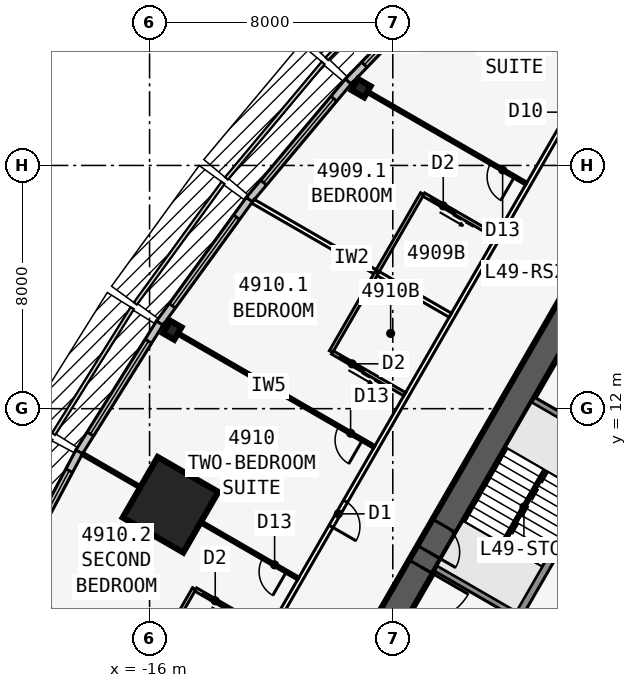
"""IFC4 building model, lengths in metres.
Left out: names, types, materials, properties, quantities, classifications, styles, units other than length and angle.
Written with IfcOpenShell. Run it as: python <this file> out.ifc"""

import sys

from ifc_helpers import new_model, si_unit, direction, frame, frame_2d, origin, origin_2d, place, context, subcontext, project, spatial, rectangle, i_section, extrude, element, fill, save


model = new_model("IFC4")
c1 = context("Model", 3, precision=1e-05, world=origin(), true_north=direction((0.0, 1.0)))
c2 = subcontext(c1, "Body", "Model", "MODEL_VIEW")
j1 = project(units=[si_unit("LENGTHUNIT", "METRE"), si_unit("PLANEANGLEUNIT", "RADIAN")], contexts=[c1])
p1 = place(None, origin())
s1 = spatial("IfcSite", under=j1, at=p1, CompositionType="ELEMENT")
p2 = place(p1, origin())
s2 = spatial("IfcBuilding", under=s1, at=p2, CompositionType="ELEMENT")
p3 = place(p2, frame((0.0, 0.0, 182.7)))
s3 = spatial("IfcBuildingStorey", under=s2, at=p3, CompositionType="ELEMENT", Elevation=182.7)
p4 = place(p3, frame((0.0, 19.052, 0.0), z_axis=(0.0, 0.0, 1.0), x_axis=(-0.499999749417, -0.866025548458, 0.0)))
e1 = element("IfcWall", 1, at=p4, inside=s3, PredefinedType="SHEAR", context=c2, shape_type="SweptSolid", body=[
    extrude(rectangle(XDim=33.0, YDim=0.9, at=frame_2d((16.5, 0.0))), origin(), (0.0, 0.0, 1.0), 3.4),
])
p5 = place(p4, frame((14.15, 0.0, 0.0)))
e2 = element("IfcOpeningElement", 2, at=p5, cuts=e1, PredefinedType="OPENING", context=c2, shape_type="SweptSolid", body=[
    extrude(rectangle(XDim=1.8, YDim=2.13, at=frame_2d((0.9, 1.065))), frame((0.0, 0.46, 0.0), z_axis=(0.0, -1.0, 0.0), x_axis=(1.0, 0.0, 0.0)), (0.0, 0.0, 1.0), 0.92),
])
p6 = place(p4, frame((12.6, 0.0, 0.0)))
e3 = element("IfcOpeningElement", 3, at=p6, cuts=e1, PredefinedType="OPENING", context=c2, shape_type="SweptSolid", body=[
    extrude(rectangle(XDim=1.0, YDim=2.13, at=frame_2d((0.5, 1.065))), frame((0.0, 0.46, 0.0), z_axis=(0.0, -1.0, 0.0), x_axis=(1.0, 0.0, 0.0)), (0.0, 0.0, 1.0), 0.92),
])
p7 = place(p3, frame((-0.062, 11.794, 0.0), z_axis=(0.0, 0.0, 1.0), x_axis=(-0.500006680225, -0.86602154692, 0.0)))
e4 = element("IfcWall", 4, at=p7, inside=s3, PredefinedType="SOLIDWALL", context=c2, shape_type="SweptSolid", body=[
    extrude(rectangle(XDim=7.733, YDim=0.25, at=frame_2d((3.866, 0.0))), origin(), (0.0, 0.0, 1.0), 3.235),
])
for number, where, z_axis, x_axis in (
    (5, (-0.679, 10.727, 0.0), (0.0, 0.0, 1.0), (-0.866, 0.5, 0.0)),
    (6, (-3.879, 5.184, 0.0), (0.0, 0.0, 1.0), (-0.866, 0.5, 0.0)),
):
    element("IfcWall", number, at=place(p3, frame(where, z_axis=z_axis, x_axis=x_axis)), inside=s3, PredefinedType="SOLIDWALL", context=c2, shape_type="SweptSolid", body=[
        extrude(rectangle(XDim=3.125, YDim=0.2, at=frame_2d((1.562, 0.0))), origin(), (0.0, 0.0, 1.0), 3.235),
    ])
for number, where, z_axis, x_axis in (
    (7, (-9.041, 22.541, 0.0), (0.0, 0.0, 1.0), (-0.5, -0.866, 0.0)),
    (8, (-15.254, 14.58, 0.0), (0.0, 0.0, 1.0), (-0.866, 0.5, 0.0)),
):
    element("IfcColumn", number, at=place(p3, frame(where, z_axis=z_axis, x_axis=x_axis)), inside=s3, PredefinedType="COLUMN", context=c2, shape_type="SweptSolid", body=[
        extrude(i_section(OverallWidth=0.424, OverallDepth=0.475, WebThickness=0.048, FlangeThickness=0.077, at=origin_2d()), origin(), (0.0, 0.0, 1.0), 3.4),
    ])
p8 = place(p3, frame((-15.312, 8.84, 0.0), z_axis=(0.0, 0.0, 1.0), x_axis=(-0.866025403784, 0.5, 0.0)))
e9 = element("IfcColumn", 9, at=p8, inside=s3, PredefinedType="COLUMN", context=c2, shape_type="SweptSolid", body=[
    extrude(rectangle(XDim=2.3, YDim=2.3, at=origin_2d()), origin(), (0.0, 0.0, 1.0), 3.4),
])
p9 = place(p3, frame((-5.91, 26.472, 0.0), z_axis=(0.0, 0.0, 1.0), x_axis=(-0.691719937936, -0.722165858693, 0.0)))
e10 = element("IfcWall", 10, at=p9, inside=s3, PredefinedType="STANDARD", context=c2, shape_type="SweptSolid", body=[
    extrude(rectangle(XDim=5.148, YDim=0.25, at=frame_2d((2.574, 0.0))), origin(), (0.0, 0.0, 1.0), 3.235),
])
p10 = place(p9, frame((0.774, 0.0, 0.45)))
e11 = element("IfcOpeningElement", 11, at=p10, cuts=e10, PredefinedType="OPENING", context=c2, shape_type="SweptSolid", body=[
    extrude(rectangle(XDim=3.6, YDim=2.4, at=frame_2d((1.8, 1.2))), frame((0.0, 0.135, 0.0), z_axis=(0.0, -1.0, 0.0), x_axis=(1.0, 0.0, 0.0)), (0.0, 0.0, 1.0), 0.27),
])
p11 = place(p3, frame((-9.465, 22.76, 0.0), z_axis=(0.0, 0.0, 1.0), x_axis=(-0.641810386606, -0.766863369607, 0.0)))
e12 = element("IfcWall", 12, at=p11, inside=s3, PredefinedType="STANDARD", context=c2, shape_type="SweptSolid", body=[
    extrude(rectangle(XDim=5.076, YDim=0.25, at=frame_2d((2.538, 0.0))), origin(), (0.0, 0.0, 1.0), 3.235),
])
p12 = place(p11, frame((0.738, 0.0, 0.45)))
e13 = element("IfcOpeningElement", 13, at=p12, cuts=e12, PredefinedType="OPENING", context=c2, shape_type="SweptSolid", body=[
    extrude(rectangle(XDim=3.6, YDim=2.4, at=frame_2d((1.8, 1.2))), frame((0.0, 0.135, 0.0), z_axis=(0.0, -1.0, 0.0), x_axis=(1.0, 0.0, 0.0)), (0.0, 0.0, 1.0), 0.27),
])
p13 = place(p3, frame((-12.718, 18.875, 0.0), z_axis=(0.0, 0.0, 1.0), x_axis=(-0.587669188412, -0.809101307001, 0.0)))
e14 = element("IfcWall", 14, at=p13, inside=s3, PredefinedType="STANDARD", context=c2, shape_type="SweptSolid", body=[
    extrude(rectangle(XDim=5.028, YDim=0.25, at=frame_2d((2.514, 0.0))), origin(), (0.0, 0.0, 1.0), 3.235),
])
p14 = place(p13, frame((0.714, 0.0, 0.45)))
e15 = element("IfcOpeningElement", 15, at=p14, cuts=e14, PredefinedType="OPENING", context=c2, shape_type="SweptSolid", body=[
    extrude(rectangle(XDim=3.6, YDim=2.4, at=frame_2d((1.8, 1.2))), frame((0.0, 0.135, 0.0), z_axis=(0.0, -1.0, 0.0), x_axis=(1.0, 0.0, 0.0)), (0.0, 0.0, 1.0), 0.27),
])
p15 = place(p3, frame((-15.667, 14.814, 0.0), z_axis=(0.0, 0.0, 1.0), x_axis=(-0.529990167382, -0.84800378683, 0.0)))
e16 = element("IfcWall", 16, at=p15, inside=s3, PredefinedType="STANDARD", context=c2, shape_type="SweptSolid", body=[
    extrude(rectangle(XDim=5.003, YDim=0.25, at=frame_2d((2.501, 0.0))), origin(), (0.0, 0.0, 1.0), 3.235),
])
p16 = place(p15, frame((0.701, 0.0, 0.45)))
e17 = element("IfcOpeningElement", 17, at=p16, cuts=e16, PredefinedType="OPENING", context=c2, shape_type="SweptSolid", body=[
    extrude(rectangle(XDim=3.6, YDim=2.4, at=frame_2d((1.8, 1.2))), frame((0.0, 0.135, 0.0), z_axis=(0.0, -1.0, 0.0), x_axis=(1.0, 0.0, 0.0)), (0.0, 0.0, 1.0), 0.27),
])
p17 = place(p3, frame((-18.314, 10.579, 0.0), z_axis=(0.0, 0.0, 1.0), x_axis=(-0.469404966864, -0.882982999317, 0.0)))
e18 = element("IfcWall", 18, at=p17, inside=s3, PredefinedType="STANDARD", context=c2, shape_type="SweptSolid", body=[
    extrude(rectangle(XDim=5.003, YDim=0.25, at=frame_2d((2.501, 0.0))), origin(), (0.0, 0.0, 1.0), 3.235),
])
p18 = place(p17, frame((0.701, 0.0, 0.45)))
e19 = element("IfcOpeningElement", 19, at=p18, cuts=e18, PredefinedType="OPENING", context=c2, shape_type="SweptSolid", body=[
    extrude(rectangle(XDim=3.6, YDim=2.4, at=frame_2d((1.8, 1.2))), frame((0.0, 0.135, 0.0), z_axis=(0.0, -1.0, 0.0), x_axis=(1.0, 0.0, 0.0)), (0.0, 0.0, 1.0), 0.27),
])
p19 = place(p3, frame((-0.5, 24.636, 0.0), z_axis=(0.0, 0.0, 1.0), x_axis=(-0.500001915564, -0.86602429783, 0.0)))
e20 = element("IfcWall", 20, at=p19, inside=s3, PredefinedType="PARTITIONING", context=c2, shape_type="SweptSolid", body=[
    extrude(rectangle(XDim=42.172, YDim=0.15, at=frame_2d((21.086, 0.0))), origin(), (0.0, 0.0, 1.0), 3.235),
])
p20 = place(p19, frame((2.338, 0.0, 0.0)))
e21 = element("IfcOpeningElement", 21, at=p20, cuts=e20, PredefinedType="OPENING", context=c2, shape_type="SweptSolid", body=[
    extrude(rectangle(XDim=0.95, YDim=2.13, at=frame_2d((0.475, 1.065))), frame((0.0, 0.085, 0.0), z_axis=(0.0, -1.0, 0.0), x_axis=(1.0, 0.0, 0.0)), (0.0, 0.0, 1.0), 0.17),
])
p21 = place(p19, frame((18.111, 0.0, 0.0)))
e22 = element("IfcOpeningElement", 22, at=p21, cuts=e20, PredefinedType="OPENING", context=c2, shape_type="SweptSolid", body=[
    extrude(rectangle(XDim=0.95, YDim=2.13, at=frame_2d((0.475, 1.065))), frame((0.0, 0.085, 0.0), z_axis=(0.0, -1.0, 0.0), x_axis=(1.0, 0.0, 0.0)), (0.0, 0.0, 1.0), 0.17),
])
p22 = place(p19, frame((28.111, 0.0, 0.0)))
e23 = element("IfcOpeningElement", 23, at=p22, cuts=e20, PredefinedType="OPENING", context=c2, shape_type="SweptSolid", body=[
    extrude(rectangle(XDim=0.95, YDim=2.13, at=frame_2d((0.475, 1.065))), frame((0.0, 0.085, 0.0), z_axis=(0.0, -1.0, 0.0), x_axis=(1.0, 0.0, 0.0)), (0.0, 0.0, 1.0), 0.17),
])
p23 = place(p19, frame((39.311, 0.0, 0.0)))
e24 = element("IfcOpeningElement", 24, at=p23, cuts=e20, PredefinedType="OPENING", context=c2, shape_type="SweptSolid", body=[
    extrude(rectangle(XDim=0.95, YDim=2.13, at=frame_2d((0.475, 1.065))), frame((0.0, 0.085, 0.0), z_axis=(0.0, -1.0, 0.0), x_axis=(1.0, 0.0, 0.0)), (0.0, 0.0, 1.0), 0.17),
])
p24 = place(p3, frame((-3.608, 19.404, 0.0), z_axis=(0.0, 0.0, 1.0), x_axis=(-0.866015989873, 0.500016305018, 0.0)))
e25 = element("IfcWall", 25, at=p24, inside=s3, PredefinedType="PARTITIONING", context=c2, shape_type="SweptSolid", body=[
    extrude(rectangle(XDim=6.616, YDim=0.1, at=frame_2d((3.308, 0.0))), origin(), (0.0, 0.0, 1.0), 2.389),
])
p25 = place(p24, frame((0.45, 0.0, 0.0)))
e26 = element("IfcOpeningElement", 26, at=p25, cuts=e25, PredefinedType="OPENING", context=c2, shape_type="SweptSolid", body=[
    extrude(rectangle(XDim=0.9, YDim=2.13, at=frame_2d((0.45, 1.065))), frame((0.0, 0.06, 0.0), z_axis=(0.0, -1.0, 0.0), x_axis=(1.0, 0.0, 0.0)), (0.0, 0.0, 1.0), 0.12),
])
p26 = place(p3, frame((-6.108, 15.073, 0.0), z_axis=(0.0, 0.0, 1.0), x_axis=(-0.866025567496, 0.499999716443, 0.0)))
e27 = element("IfcWall", 27, at=p26, inside=s3, PredefinedType="PARTITIONING", context=c2, shape_type="SweptSolid", body=[
    extrude(rectangle(XDim=7.495, YDim=0.15, at=frame_2d((3.748, 0.0))), origin(), (0.0, 0.0, 1.0), 2.389),
])
p27 = place(p3, frame((-8.608, 10.743, 0.0), z_axis=(0.0, 0.0, 1.0), x_axis=(-0.866041663918, 0.499971835565, 0.0)))
e28 = element("IfcWall", 28, at=p27, inside=s3, PredefinedType="PARTITIONING", context=c2, shape_type="SweptSolid", body=[
    extrude(rectangle(XDim=8.022, YDim=0.1, at=frame_2d((4.011, 0.0))), origin(), (0.0, 0.0, 1.0), 2.389),
])
p28 = place(p27, frame((0.45, 0.0, 0.0)))
e29 = element("IfcOpeningElement", 29, at=p28, cuts=e28, PredefinedType="OPENING", context=c2, shape_type="SweptSolid", body=[
    extrude(rectangle(XDim=0.9, YDim=2.13, at=frame_2d((0.45, 1.065))), frame((0.0, 0.06, 0.0), z_axis=(0.0, -1.0, 0.0), x_axis=(1.0, 0.0, 0.0)), (0.0, 0.0, 1.0), 0.12),
])
p29 = place(p3, frame((-11.108, 6.413, 0.0), z_axis=(0.0, 0.0, 1.0), x_axis=(-0.866026407964, 0.499998260706, 0.0)))
e30 = element("IfcWall", 30, at=p29, inside=s3, PredefinedType="PARTITIONING", context=c2, shape_type="SweptSolid", body=[
    extrude(rectangle(XDim=8.199, YDim=0.1, at=frame_2d((4.099, 0.0))), origin(), (0.0, 0.0, 1.0), 2.389),
])
p30 = place(p29, frame((0.45, 0.0, 0.0)))
e31 = element("IfcOpeningElement", 31, at=p30, cuts=e30, PredefinedType="OPENING", context=c2, shape_type="SweptSolid", body=[
    extrude(rectangle(XDim=0.9, YDim=2.13, at=frame_2d((0.45, 1.065))), frame((0.0, 0.06, 0.0), z_axis=(0.0, -1.0, 0.0), x_axis=(1.0, 0.0, 0.0)), (0.0, 0.0, 1.0), 0.12),
])
p31 = place(p3, frame((-13.608, 2.083, 0.0), z_axis=(0.0, 0.0, 1.0), x_axis=(-0.866028486751, 0.499994660107, 0.0)))
e32 = element("IfcWall", 32, at=p31, inside=s3, PredefinedType="PARTITIONING", context=c2, shape_type="SweptSolid", body=[
    extrude(rectangle(XDim=8.022, YDim=0.15, at=frame_2d((4.011, 0.0))), origin(), (0.0, 0.0, 1.0), 2.389),
])
p32 = place(p3, frame((-7.033, 19.072, 0.0), z_axis=(0.0, 0.0, 1.0), x_axis=(-0.499990139034, -0.866031096941, 0.0)))
e33 = element("IfcWall", 33, at=p32, inside=s3, PredefinedType="PLUMBINGWALL", context=c2, shape_type="SweptSolid", body=[
    extrude(rectangle(XDim=3.0, YDim=0.12, at=frame_2d((1.5, 0.0))), origin(), (0.0, 0.0, 1.0), 3.235),
])
p33 = place(p3, frame((-4.608, 17.671, 0.0), z_axis=(0.0, 0.0, 1.0), x_axis=(-0.865997131366, 0.500048966069, 0.0)))
e34 = element("IfcWall", 34, at=p33, inside=s3, PredefinedType="PLUMBINGWALL", context=c2, shape_type="SweptSolid", body=[
    extrude(rectangle(XDim=2.74, YDim=0.12, at=frame_2d((1.37, 0.0))), origin(), (0.0, 0.0, 1.0), 3.235),
])
p34 = place(p33, frame((1.55, 0.0, 0.0)))
e35 = element("IfcOpeningElement", 35, at=p34, cuts=e34, PredefinedType="OPENING", context=c2, shape_type="SweptSolid", body=[
    extrude(rectangle(XDim=0.9, YDim=2.13, at=frame_2d((0.45, 1.065))), frame((0.0, 0.07, 0.0), z_axis=(0.0, -1.0, 0.0), x_axis=(1.0, 0.0, 0.0)), (0.0, 0.0, 1.0), 0.14),
])
p35 = place(p3, frame((-8.533, 16.473, 0.0), z_axis=(0.0, 0.0, 1.0), x_axis=(-0.499990139034, -0.866031096941, 0.0)))
e36 = element("IfcWall", 36, at=p35, inside=s3, PredefinedType="PLUMBINGWALL", context=c2, shape_type="SweptSolid", body=[
    extrude(rectangle(XDim=3.0, YDim=0.12, at=frame_2d((1.5, 0.0))), origin(), (0.0, 0.0, 1.0), 3.235),
])
p36 = place(p3, frame((-7.608, 12.475, 0.0), z_axis=(0.0, 0.0, 1.0), x_axis=(-0.866035715982, 0.499982138324, 0.0)))
e37 = element("IfcWall", 37, at=p36, inside=s3, PredefinedType="PLUMBINGWALL", context=c2, shape_type="SweptSolid", body=[
    extrude(rectangle(XDim=2.74, YDim=0.12, at=frame_2d((1.37, 0.0))), origin(), (0.0, 0.0, 1.0), 3.235),
])
p37 = place(p36, frame((1.55, 0.0, 0.0)))
e38 = element("IfcOpeningElement", 38, at=p37, cuts=e37, PredefinedType="OPENING", context=c2, shape_type="SweptSolid", body=[
    extrude(rectangle(XDim=0.9, YDim=2.13, at=frame_2d((0.45, 1.065))), frame((0.0, 0.07, 0.0), z_axis=(0.0, -1.0, 0.0), x_axis=(1.0, 0.0, 0.0)), (0.0, 0.0, 1.0), 0.14),
])
p38 = place(p3, frame((-14.533, 6.081, 0.0), z_axis=(0.0, 0.0, 1.0), x_axis=(-0.499990139034, -0.866031096941, 0.0)))
e39 = element("IfcWall", 39, at=p38, inside=s3, PredefinedType="PLUMBINGWALL", context=c2, shape_type="SweptSolid", body=[
    extrude(rectangle(XDim=3.0, YDim=0.12, at=frame_2d((1.5, 0.0))), origin(), (0.0, 0.0, 1.0), 3.235),
])
p39 = place(p3, frame((-12.108, 4.681, 0.0), z_axis=(0.0, 0.0, 1.0), x_axis=(-0.866035715982, 0.499982138324, 0.0)))
e40 = element("IfcWall", 40, at=p39, inside=s3, PredefinedType="PLUMBINGWALL", context=c2, shape_type="SweptSolid", body=[
    extrude(rectangle(XDim=2.74, YDim=0.12, at=frame_2d((1.37, 0.0))), origin(), (0.0, 0.0, 1.0), 3.235),
])
p40 = place(p39, frame((1.55, 0.0, 0.0)))
e41 = element("IfcOpeningElement", 41, at=p40, cuts=e40, PredefinedType="OPENING", context=c2, shape_type="SweptSolid", body=[
    extrude(rectangle(XDim=0.9, YDim=2.13, at=frame_2d((0.45, 1.065))), frame((0.0, 0.07, 0.0), z_axis=(0.0, -1.0, 0.0), x_axis=(1.0, 0.0, 0.0)), (0.0, 0.0, 1.0), 0.14),
])
p41 = place(p3, frame((-2.988, 9.978, 0.0), z_axis=(0.0, 0.0, 1.0), x_axis=(-0.499992232847, -0.866029888106, 0.0)))
e42 = element("IfcWall", 42, at=p41, inside=s3, PredefinedType="SOLIDWALL", context=c2, shape_type="SweptSolid", body=[
    extrude(rectangle(XDim=2.794, YDim=0.1, at=frame_2d((1.397, 0.0))), origin(), (0.0, 0.0, 1.0), 3.4),
])
p42 = place(p10, origin())
e43 = element("IfcWindow", 43, at=p42, inside=s3, PartitioningType="SINGLE_PANEL", PredefinedType="WINDOW", context=c2, shape_type="SweptSolid", body=[
    extrude(rectangle(XDim=3.6, YDim=2.4, at=frame_2d((1.8, 1.2))), frame((0.0, 0.03, 0.0), z_axis=(0.0, -1.0, 0.0), x_axis=(1.0, 0.0, 0.0)), (0.0, 0.0, 1.0), 0.06),
])
fill(e11, e43)
p43 = place(p12, origin())
e44 = element("IfcWindow", 44, at=p43, inside=s3, PartitioningType="SINGLE_PANEL", PredefinedType="WINDOW", context=c2, shape_type="SweptSolid", body=[
    extrude(rectangle(XDim=3.6, YDim=2.4, at=frame_2d((1.8, 1.2))), frame((0.0, 0.03, 0.0), z_axis=(0.0, -1.0, 0.0), x_axis=(1.0, 0.0, 0.0)), (0.0, 0.0, 1.0), 0.06),
])
fill(e13, e44)
p44 = place(p14, origin())
e45 = element("IfcWindow", 45, at=p44, inside=s3, PartitioningType="SINGLE_PANEL", PredefinedType="WINDOW", context=c2, shape_type="SweptSolid", body=[
    extrude(rectangle(XDim=3.6, YDim=2.4, at=frame_2d((1.8, 1.2))), frame((0.0, 0.03, 0.0), z_axis=(0.0, -1.0, 0.0), x_axis=(1.0, 0.0, 0.0)), (0.0, 0.0, 1.0), 0.06),
])
fill(e15, e45)
p45 = place(p16, origin())
e46 = element("IfcWindow", 46, at=p45, inside=s3, PartitioningType="SINGLE_PANEL", PredefinedType="WINDOW", context=c2, shape_type="SweptSolid", body=[
    extrude(rectangle(XDim=3.6, YDim=2.4, at=frame_2d((1.8, 1.2))), frame((0.0, 0.03, 0.0), z_axis=(0.0, -1.0, 0.0), x_axis=(1.0, 0.0, 0.0)), (0.0, 0.0, 1.0), 0.06),
])
fill(e17, e46)
p46 = place(p18, origin())
e47 = element("IfcWindow", 47, at=p46, inside=s3, PartitioningType="SINGLE_PANEL", PredefinedType="WINDOW", context=c2, shape_type="SweptSolid", body=[
    extrude(rectangle(XDim=3.6, YDim=2.4, at=frame_2d((1.8, 1.2))), frame((0.0, 0.03, 0.0), z_axis=(0.0, -1.0, 0.0), x_axis=(1.0, 0.0, 0.0)), (0.0, 0.0, 1.0), 0.06),
])
fill(e19, e47)
p47 = place(p25, origin())
e48 = element("IfcDoor", 48, at=p47, inside=s3, OperationType="SINGLE_SWING_LEFT", PredefinedType="DOOR", context=c2, shape_type="SweptSolid", body=[
    extrude(rectangle(XDim=0.9, YDim=2.13, at=frame_2d((0.45, 1.065))), frame((0.0, 0.025, 0.0), z_axis=(0.0, -1.0, 0.0), x_axis=(1.0, 0.0, 0.0)), (0.0, 0.0, 1.0), 0.05),
])
fill(e26, e48)
p48 = place(p28, origin())
e49 = element("IfcDoor", 49, at=p48, inside=s3, OperationType="SINGLE_SWING_LEFT", PredefinedType="DOOR", context=c2, shape_type="SweptSolid", body=[
    extrude(rectangle(XDim=0.9, YDim=2.13, at=frame_2d((0.45, 1.065))), frame((0.0, 0.025, 0.0), z_axis=(0.0, -1.0, 0.0), x_axis=(1.0, 0.0, 0.0)), (0.0, 0.0, 1.0), 0.05),
])
fill(e29, e49)
p49 = place(p30, origin())
e50 = element("IfcDoor", 50, at=p49, inside=s3, OperationType="SINGLE_SWING_LEFT", PredefinedType="DOOR", context=c2, shape_type="SweptSolid", body=[
    extrude(rectangle(XDim=0.9, YDim=2.13, at=frame_2d((0.45, 1.065))), frame((0.0, 0.025, 0.0), z_axis=(0.0, -1.0, 0.0), x_axis=(1.0, 0.0, 0.0)), (0.0, 0.0, 1.0), 0.05),
])
fill(e31, e50)
p50 = place(p34, origin())
e51 = element("IfcDoor", 51, at=p50, inside=s3, OperationType="SLIDING_TO_LEFT", PredefinedType="DOOR", context=c2, shape_type="SweptSolid", body=[
    extrude(rectangle(XDim=0.9, YDim=2.13, at=frame_2d((0.45, 1.065))), frame((0.0, 0.025, 0.0), z_axis=(0.0, -1.0, 0.0), x_axis=(1.0, 0.0, 0.0)), (0.0, 0.0, 1.0), 0.05),
])
fill(e35, e51)
p51 = place(p37, origin())
e52 = element("IfcDoor", 52, at=p51, inside=s3, OperationType="SLIDING_TO_LEFT", PredefinedType="DOOR", context=c2, shape_type="SweptSolid", body=[
    extrude(rectangle(XDim=0.9, YDim=2.13, at=frame_2d((0.45, 1.065))), frame((0.0, 0.025, 0.0), z_axis=(0.0, -1.0, 0.0), x_axis=(1.0, 0.0, 0.0)), (0.0, 0.0, 1.0), 0.05),
])
fill(e38, e52)
p52 = place(p21, origin())
e53 = element("IfcDoor", 53, at=p52, inside=s3, OperationType="SINGLE_SWING_RIGHT", PredefinedType="DOOR", context=c2, shape_type="SweptSolid", body=[
    extrude(rectangle(XDim=0.95, YDim=2.13, at=frame_2d((0.475, 1.065))), frame((0.0, 0.025, 0.0), z_axis=(0.0, -1.0, 0.0), x_axis=(1.0, 0.0, 0.0)), (0.0, 0.0, 1.0), 0.05),
])
fill(e22, e53)
p53 = place(p40, origin())
e54 = element("IfcDoor", 54, at=p53, inside=s3, OperationType="SLIDING_TO_LEFT", PredefinedType="DOOR", context=c2, shape_type="SweptSolid", body=[
    extrude(rectangle(XDim=0.9, YDim=2.13, at=frame_2d((0.45, 1.065))), frame((0.0, 0.025, 0.0), z_axis=(0.0, -1.0, 0.0), x_axis=(1.0, 0.0, 0.0)), (0.0, 0.0, 1.0), 0.05),
])
fill(e41, e54)
p54 = place(p5, origin())
e55 = element("IfcDoor", 55, at=p54, inside=s3, OperationType="DOUBLE_DOOR_SINGLE_SWING", PredefinedType="DOOR", context=c2, shape_type="SweptSolid", body=[
    extrude(rectangle(XDim=1.8, YDim=2.13, at=frame_2d((0.9, 1.065))), frame((0.0, 0.025, 0.0), z_axis=(0.0, -1.0, 0.0), x_axis=(1.0, 0.0, 0.0)), (0.0, 0.0, 1.0), 0.05),
])
fill(e2, e55)
p55 = place(p6, origin())
e56 = element("IfcDoor", 56, at=p55, inside=s3, OperationType="SINGLE_SWING_RIGHT", PredefinedType="DOOR", context=c2, shape_type="SweptSolid", body=[
    extrude(rectangle(XDim=1.0, YDim=2.13, at=frame_2d((0.5, 1.065))), frame((0.0, 0.025, 0.0), z_axis=(0.0, -1.0, 0.0), x_axis=(1.0, 0.0, 0.0)), (0.0, 0.0, 1.0), 0.05),
])
fill(e3, e56)
save(model, sys.argv[1])
